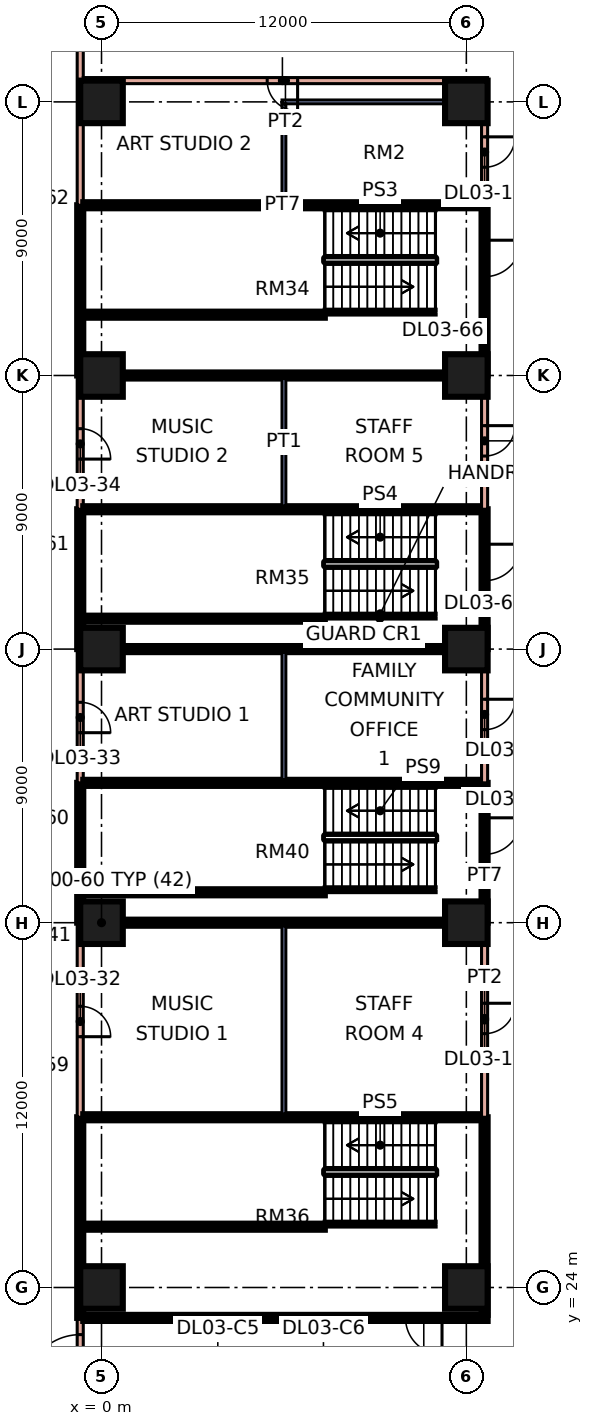
"""IFC4 building model, lengths in metres.
Left out: names, types, materials, properties, quantities, classifications, styles, units other than length and angle.
Written with IfcOpenShell. Run it as: python <this file> out.ifc"""

import sys

from ifc_helpers import new_model, si_unit, direction, frame, frame_2d, origin, origin_2d, place, context, subcontext, project, spatial, rectangle, extrude, element, fill, save


model = new_model("IFC4")
c1 = context("Model", 3, precision=1e-05, world=origin(), true_north=direction((0.0, 1.0)))
c2 = subcontext(c1, "Body", "Model", "MODEL_VIEW")
j1 = project(units=[si_unit("LENGTHUNIT", "METRE"), si_unit("PLANEANGLEUNIT", "RADIAN")], contexts=[c1])
p1 = place(None, origin())
s1 = spatial("IfcSite", under=j1, at=p1, CompositionType="ELEMENT")
p2 = place(p1, origin())
s2 = spatial("IfcBuilding", under=s1, at=p2, CompositionType="ELEMENT")
p3 = place(p2, frame((0.0, 0.0, 16.8)))
s3 = spatial("IfcBuildingStorey", under=s2, at=p3, CompositionType="ELEMENT", Elevation=16.8)
for number, where, z_axis, x_axis in (
    (1, (0.0, 24.0, 0.0), (0.0, 0.0, 1.0), (1.0, 0.0, 0.0)),
    (2, (12.0, 24.0, 0.0), (0.0, 0.0, 1.0), (1.0, 0.0, 0.0)),
    (3, (0.0, 36.0, 0.0), (0.0, 0.0, 1.0), (1.0, 0.0, 0.0)),
    (4, (12.0, 36.0, 0.0), (0.0, 0.0, 1.0), (1.0, 0.0, 0.0)),
    (5, (0.0, 45.0, 0.0), (0.0, 0.0, 1.0), (1.0, 0.0, 0.0)),
    (6, (12.0, 45.0, 0.0), (0.0, 0.0, 1.0), (1.0, 0.0, 0.0)),
    (7, (0.0, 54.0, 0.0), (0.0, 0.0, 1.0), (1.0, 0.0, 0.0)),
    (8, (12.0, 54.0, 0.0), (0.0, 0.0, 1.0), (1.0, 0.0, 0.0)),
    (9, (0.0, 63.0, 0.0), (0.0, 0.0, 1.0), (1.0, 0.0, 0.0)),
    (10, (12.0, 63.0, 0.0), (0.0, 0.0, 1.0), (1.0, 0.0, 0.0)),
):
    element("IfcColumn", number, at=place(p3, frame(where, z_axis=z_axis, x_axis=x_axis)), inside=s3, PredefinedType="COLUMN", context=c2, shape_type="SweptSolid", body=[
        extrude(rectangle(XDim=1.4, YDim=1.4, at=origin_2d()), origin(), (0.0, 0.0, 1.0), 4.8),
    ])
p4 = place(p3, frame((-0.7, 1.304, 0.0), z_axis=(0.0, 0.0, 1.0), x_axis=(0.0, 1.0, 0.0)))
e11 = element("IfcWall", 11, at=p4, inside=s3, PredefinedType="PARTITIONING", context=c2, shape_type="SweptSolid", body=[
    extrude(rectangle(XDim=21.696, YDim=0.2, at=frame_2d((10.848, 0.0))), origin(), (0.0, 0.0, 1.0), 4.4),
])
p5 = place(p4, frame((19.346, 0.0, 0.0)))
e12 = element("IfcOpeningElement", 12, at=p5, cuts=e11, PredefinedType="OPENING", context=c2, shape_type="SweptSolid", body=[
    extrude(rectangle(XDim=1.8, YDim=2.1, at=frame_2d((0.9, 1.05))), frame((0.0, 0.11, 0.0), z_axis=(0.0, -1.0, 0.0), x_axis=(1.0, 0.0, 0.0)), (0.0, 0.0, 1.0), 0.22),
])
p6 = place(p4, frame((11.596, 0.0, 0.0)))
e13 = element("IfcOpeningElement", 13, at=p6, cuts=e11, PredefinedType="OPENING", context=c2, shape_type="SweptSolid", body=[
    extrude(rectangle(XDim=1.0, YDim=2.1, at=frame_2d((0.5, 1.05))), frame((0.0, 0.11, 0.0), z_axis=(0.0, -1.0, 0.0), x_axis=(1.0, 0.0, 0.0)), (0.0, 0.0, 1.0), 0.22),
])
p7 = place(p4, frame((2.295, 0.0, 0.0)))
e14 = element("IfcOpeningElement", 14, at=p7, cuts=e11, PredefinedType="OPENING", context=c2, shape_type="SweptSolid", body=[
    extrude(rectangle(XDim=1.0, YDim=2.1, at=frame_2d((0.5, 1.05))), frame((0.0, 0.11, 0.0), z_axis=(0.0, -1.0, 0.0), x_axis=(1.0, 0.0, 0.0)), (0.0, 0.0, 1.0), 0.22),
])
p8 = place(p3, frame((-0.7, 23.0, 0.0), z_axis=(0.0, 0.0, 1.0), x_axis=(0.0, 1.0, 0.0)))
e15 = element("IfcWall", 15, at=p8, inside=s3, PredefinedType="SOLIDWALL", context=c2, shape_type="SweptSolid", body=[
    extrude(rectangle(XDim=6.6, YDim=0.2, at=frame_2d((3.3, 0.0))), origin(), (0.0, 0.0, 1.0), 4.4),
])
p9 = place(p3, frame((-0.7, 29.6, 0.0), z_axis=(0.0, 0.0, 1.0), x_axis=(0.0, 1.0, 0.0)))
e16 = element("IfcWall", 16, at=p9, inside=s3, PredefinedType="PARTITIONING", context=c2, shape_type="SweptSolid", body=[
    extrude(rectangle(XDim=6.4, YDim=0.2, at=frame_2d((3.2, 0.0))), origin(), (0.0, 0.0, 1.0), 4.4),
])
p10 = place(p9, frame((2.65, 0.0, 0.0)))
e17 = element("IfcOpeningElement", 17, at=p10, cuts=e16, PredefinedType="OPENING", context=c2, shape_type="SweptSolid", body=[
    extrude(rectangle(XDim=1.0, YDim=2.1, at=frame_2d((0.5, 1.05))), frame((0.0, 0.11, 0.0), z_axis=(0.0, -1.0, 0.0), x_axis=(1.0, 0.0, 0.0)), (0.0, 0.0, 1.0), 0.22),
])
p11 = place(p3, frame((-0.7, 36.0, 0.0), z_axis=(0.0, 0.0, 1.0), x_axis=(0.0, 1.0, 0.0)))
e18 = element("IfcWall", 18, at=p11, inside=s3, PredefinedType="SOLIDWALL", context=c2, shape_type="SweptSolid", body=[
    extrude(rectangle(XDim=4.6, YDim=0.2, at=frame_2d((2.3, 0.0))), origin(), (0.0, 0.0, 1.0), 4.4),
])
p12 = place(p3, frame((-0.7, 40.6, 0.0), z_axis=(0.0, 0.0, 1.0), x_axis=(0.0, 1.0, 0.0)))
e19 = element("IfcWall", 19, at=p12, inside=s3, PredefinedType="PARTITIONING", context=c2, shape_type="SweptSolid", body=[
    extrude(rectangle(XDim=4.4, YDim=0.2, at=frame_2d((2.2, 0.0))), origin(), (0.0, 0.0, 1.0), 4.4),
])
p13 = place(p12, frame((1.65, 0.0, 0.0)))
e20 = element("IfcOpeningElement", 20, at=p13, cuts=e19, PredefinedType="OPENING", context=c2, shape_type="SweptSolid", body=[
    extrude(rectangle(XDim=1.0, YDim=2.1, at=frame_2d((0.5, 1.05))), frame((0.0, 0.11, 0.0), z_axis=(0.0, -1.0, 0.0), x_axis=(1.0, 0.0, 0.0)), (0.0, 0.0, 1.0), 0.22),
])
p14 = place(p3, frame((-0.7, 45.0, 0.0), z_axis=(0.0, 0.0, 1.0), x_axis=(0.0, 1.0, 0.0)))
e21 = element("IfcWall", 21, at=p14, inside=s3, PredefinedType="SOLIDWALL", context=c2, shape_type="SweptSolid", body=[
    extrude(rectangle(XDim=4.6, YDim=0.2, at=frame_2d((2.3, 0.0))), origin(), (0.0, 0.0, 1.0), 4.4),
])
p15 = place(p3, frame((-0.7, 49.6, 0.0), z_axis=(0.0, 0.0, 1.0), x_axis=(0.0, 1.0, 0.0)))
e22 = element("IfcWall", 22, at=p15, inside=s3, PredefinedType="PARTITIONING", context=c2, shape_type="SweptSolid", body=[
    extrude(rectangle(XDim=4.4, YDim=0.2, at=frame_2d((2.2, 0.0))), origin(), (0.0, 0.0, 1.0), 4.4),
])
p16 = place(p15, frame((1.65, 0.0, 0.0)))
e23 = element("IfcOpeningElement", 23, at=p16, cuts=e22, PredefinedType="OPENING", context=c2, shape_type="SweptSolid", body=[
    extrude(rectangle(XDim=1.0, YDim=2.1, at=frame_2d((0.5, 1.05))), frame((0.0, 0.11, 0.0), z_axis=(0.0, -1.0, 0.0), x_axis=(1.0, 0.0, 0.0)), (0.0, 0.0, 1.0), 0.22),
])
p17 = place(p3, frame((-0.7, 54.0, 0.0), z_axis=(0.0, 0.0, 1.0), x_axis=(0.0, 1.0, 0.0)))
e24 = element("IfcWall", 24, at=p17, inside=s3, PredefinedType="SOLIDWALL", context=c2, shape_type="SweptSolid", body=[
    extrude(rectangle(XDim=5.6, YDim=0.2, at=frame_2d((2.8, 0.0))), origin(), (0.0, 0.0, 1.0), 4.4),
])
p18 = place(p3, frame((-0.7, 59.6, 0.0), z_axis=(0.0, 0.0, 1.0), x_axis=(0.0, 1.0, 0.0)))
e25 = element("IfcWall", 25, at=p18, inside=s3, PredefinedType="PARTITIONING", context=c2, shape_type="SweptSolid", body=[
    extrude(rectangle(XDim=6.4, YDim=0.2, at=frame_2d((3.2, 0.0))), origin(), (0.0, 0.0, 1.0), 4.4),
])
p19 = place(p3, frame((-0.6, 23.0, 0.0), z_axis=(0.0, 0.0, 1.0), x_axis=(1.0, 0.0, 0.0)))
e26 = element("IfcWall", 26, at=p19, inside=s3, PredefinedType="SOLIDWALL", context=c2, shape_type="SweptSolid", body=[
    extrude(rectangle(XDim=13.3, YDim=0.2, at=frame_2d((6.65, 0.0))), origin(), (0.0, 0.0, 1.0), 4.4),
])
p20 = place(p19, frame((10.6, 0.0, 0.0)))
e27 = element("IfcOpeningElement", 27, at=p20, cuts=e26, PredefinedType="OPENING", context=c2, shape_type="SweptSolid", body=[
    extrude(rectangle(XDim=1.2, YDim=2.1, at=frame_2d((0.6, 1.05))), frame((0.0, 0.11, 0.0), z_axis=(0.0, -1.0, 0.0), x_axis=(1.0, 0.0, 0.0)), (0.0, 0.0, 1.0), 0.22),
])
for number, where, z_axis, x_axis in (
    (28, (-0.6, 29.6, 0.0), (0.0, 0.0, 1.0), (1.0, 0.0, 0.0)),
    (29, (-0.6, 36.0, 0.0), (0.0, 0.0, 1.0), (1.0, 0.0, 0.0)),
    (30, (-0.6, 40.6, 0.0), (0.0, 0.0, 1.0), (1.0, 0.0, 0.0)),
    (31, (-0.6, 45.0, 0.0), (0.0, 0.0, 1.0), (1.0, 0.0, 0.0)),
    (32, (-0.6, 49.6, 0.0), (0.0, 0.0, 1.0), (1.0, 0.0, 0.0)),
    (33, (-0.6, 54.0, 0.0), (0.0, 0.0, 1.0), (1.0, 0.0, 0.0)),
    (34, (-0.6, 59.6, 0.0), (0.0, 0.0, 1.0), (1.0, 0.0, 0.0)),
):
    element("IfcWall", number, at=place(p3, frame(where, z_axis=z_axis, x_axis=x_axis)), inside=s3, PredefinedType="SOLIDWALL", context=c2, shape_type="SweptSolid", body=[
        extrude(rectangle(XDim=13.1, YDim=0.2, at=frame_2d((6.55, 0.0))), origin(), (0.0, 0.0, 1.0), 4.4),
    ])
p21 = place(p3, frame((-0.6, 63.7, 0.0), z_axis=(0.0, 0.0, 1.0), x_axis=(1.0, 0.0, 0.0)))
e35 = element("IfcWall", 35, at=p21, inside=s3, PredefinedType="PARTITIONING", context=c2, shape_type="SweptSolid", body=[
    extrude(rectangle(XDim=13.3, YDim=0.2, at=frame_2d((6.65, 0.0))), origin(), (0.0, 0.0, 1.0), 4.4),
])
p22 = place(p21, frame((6.05, 0.0, 0.0)))
e36 = element("IfcOpeningElement", 36, at=p22, cuts=e35, PredefinedType="OPENING", context=c2, shape_type="SweptSolid", body=[
    extrude(rectangle(XDim=1.0, YDim=2.1, at=frame_2d((0.5, 1.05))), frame((0.0, 0.11, 0.0), z_axis=(0.0, -1.0, 0.0), x_axis=(1.0, 0.0, 0.0)), (0.0, 0.0, 1.0), 0.22),
])
p23 = place(p3, frame((5.938, 63.0, 0.0), z_axis=(0.0, 0.0, 1.0), x_axis=(1.0, 0.0, 0.0)))
e37 = element("IfcWall", 37, at=p23, inside=s3, PredefinedType="PARTITIONING", context=c2, shape_type="SweptSolid", body=[
    extrude(rectangle(XDim=6.562, YDim=0.125, at=frame_2d((3.281, 0.0))), origin(), (0.0, 0.0, 1.0), 4.4),
])
p24 = place(p3, frame((6.0, 29.7, 0.0), z_axis=(0.0, 0.0, 1.0), x_axis=(0.0, 1.0, 0.0)))
e38 = element("IfcWall", 38, at=p24, inside=s3, PredefinedType="PARTITIONING", context=c2, shape_type="SweptSolid", body=[
    extrude(rectangle(XDim=6.2, YDim=0.125, at=frame_2d((3.1, 0.0))), origin(), (0.0, 0.0, 1.0), 4.4),
])
for number, where, z_axis, x_axis in (
    (39, (6.0, 40.7, 0.0), (0.0, 0.0, 1.0), (0.0, 1.0, 0.0)),
    (40, (6.0, 49.7, 0.0), (0.0, 0.0, 1.0), (0.0, 1.0, 0.0)),
):
    element("IfcWall", number, at=place(p3, frame(where, z_axis=z_axis, x_axis=x_axis)), inside=s3, PredefinedType="PARTITIONING", context=c2, shape_type="SweptSolid", body=[
        extrude(rectangle(XDim=4.2, YDim=0.125, at=frame_2d((2.1, 0.0))), origin(), (0.0, 0.0, 1.0), 4.4),
    ])
p25 = place(p3, frame((6.0, 59.7, 0.0), z_axis=(0.0, 0.0, 1.0), x_axis=(0.0, 1.0, 0.0)))
e41 = element("IfcWall", 41, at=p25, inside=s3, PredefinedType="PARTITIONING", context=c2, shape_type="SweptSolid", body=[
    extrude(rectangle(XDim=3.238, YDim=0.125, at=frame_2d((1.619, 0.0))), origin(), (0.0, 0.0, 1.0), 4.4),
])
p26 = place(p3, frame((12.6, 23.1, 0.0), z_axis=(0.0, 0.0, 1.0), x_axis=(0.0, 1.0, 0.0)))
e42 = element("IfcWall", 42, at=p26, inside=s3, PredefinedType="SOLIDWALL", context=c2, shape_type="SweptSolid", body=[
    extrude(rectangle(XDim=6.5, YDim=0.2, at=frame_2d((3.25, 0.0))), origin(), (0.0, 0.0, 1.0), 4.4),
])
p27 = place(p3, frame((12.6, 29.6, 0.0), z_axis=(0.0, 0.0, 1.0), x_axis=(0.0, 1.0, 0.0)))
e43 = element("IfcWall", 43, at=p27, inside=s3, PredefinedType="PARTITIONING", context=c2, shape_type="SweptSolid", body=[
    extrude(rectangle(XDim=6.4, YDim=0.2, at=frame_2d((3.2, 0.0))), origin(), (0.0, 0.0, 1.0), 4.4),
])
p28 = place(p27, frame((2.75, 0.0, 0.0)))
e44 = element("IfcOpeningElement", 44, at=p28, cuts=e43, PredefinedType="OPENING", context=c2, shape_type="SweptSolid", body=[
    extrude(rectangle(XDim=1.0, YDim=2.1, at=frame_2d((0.5, 1.05))), frame((0.0, 0.11, 0.0), z_axis=(0.0, -1.0, 0.0), x_axis=(1.0, 0.0, 0.0)), (0.0, 0.0, 1.0), 0.22),
])
p29 = place(p3, frame((12.6, 36.0, 0.0), z_axis=(0.0, 0.0, 1.0), x_axis=(0.0, 1.0, 0.0)))
e45 = element("IfcWall", 45, at=p29, inside=s3, PredefinedType="SOLIDWALL", context=c2, shape_type="SweptSolid", body=[
    extrude(rectangle(XDim=4.6, YDim=0.2, at=frame_2d((2.3, 0.0))), origin(), (0.0, 0.0, 1.0), 4.4),
])
p30 = place(p29, frame((2.25, 0.0, 0.0)))
e46 = element("IfcOpeningElement", 46, at=p30, cuts=e45, PredefinedType="OPENING", context=c2, shape_type="SweptSolid", body=[
    extrude(rectangle(XDim=1.2, YDim=2.1, at=frame_2d((0.6, 1.05))), frame((0.0, 0.11, 0.0), z_axis=(0.0, -1.0, 0.0), x_axis=(1.0, 0.0, 0.0)), (0.0, 0.0, 1.0), 0.22),
])
p31 = place(p3, frame((12.6, 40.6, 0.0), z_axis=(0.0, 0.0, 1.0), x_axis=(0.0, 1.0, 0.0)))
e47 = element("IfcWall", 47, at=p31, inside=s3, PredefinedType="PARTITIONING", context=c2, shape_type="SweptSolid", body=[
    extrude(rectangle(XDim=4.4, YDim=0.2, at=frame_2d((2.2, 0.0))), origin(), (0.0, 0.0, 1.0), 4.4),
])
p32 = place(p31, frame((1.75, 0.0, 0.0)))
e48 = element("IfcOpeningElement", 48, at=p32, cuts=e47, PredefinedType="OPENING", context=c2, shape_type="SweptSolid", body=[
    extrude(rectangle(XDim=1.0, YDim=2.1, at=frame_2d((0.5, 1.05))), frame((0.0, 0.11, 0.0), z_axis=(0.0, -1.0, 0.0), x_axis=(1.0, 0.0, 0.0)), (0.0, 0.0, 1.0), 0.22),
])
p33 = place(p3, frame((12.6, 45.0, 0.0), z_axis=(0.0, 0.0, 1.0), x_axis=(0.0, 1.0, 0.0)))
e49 = element("IfcWall", 49, at=p33, inside=s3, PredefinedType="SOLIDWALL", context=c2, shape_type="SweptSolid", body=[
    extrude(rectangle(XDim=4.6, YDim=0.2, at=frame_2d((2.3, 0.0))), origin(), (0.0, 0.0, 1.0), 4.4),
])
p34 = place(p33, frame((2.25, 0.0, 0.0)))
e50 = element("IfcOpeningElement", 50, at=p34, cuts=e49, PredefinedType="OPENING", context=c2, shape_type="SweptSolid", body=[
    extrude(rectangle(XDim=1.2, YDim=2.1, at=frame_2d((0.6, 1.05))), frame((0.0, 0.11, 0.0), z_axis=(0.0, -1.0, 0.0), x_axis=(1.0, 0.0, 0.0)), (0.0, 0.0, 1.0), 0.22),
])
p35 = place(p3, frame((12.6, 49.6, 0.0), z_axis=(0.0, 0.0, 1.0), x_axis=(0.0, 1.0, 0.0)))
e51 = element("IfcWall", 51, at=p35, inside=s3, PredefinedType="PARTITIONING", context=c2, shape_type="SweptSolid", body=[
    extrude(rectangle(XDim=4.4, YDim=0.2, at=frame_2d((2.2, 0.0))), origin(), (0.0, 0.0, 1.0), 4.4),
])
p36 = place(p35, frame((1.75, 0.0, 0.0)))
e52 = element("IfcOpeningElement", 52, at=p36, cuts=e51, PredefinedType="OPENING", context=c2, shape_type="SweptSolid", body=[
    extrude(rectangle(XDim=1.0, YDim=2.1, at=frame_2d((0.5, 1.05))), frame((0.0, 0.11, 0.0), z_axis=(0.0, -1.0, 0.0), x_axis=(1.0, 0.0, 0.0)), (0.0, 0.0, 1.0), 0.22),
])
p37 = place(p3, frame((12.6, 54.0, 0.0), z_axis=(0.0, 0.0, 1.0), x_axis=(0.0, 1.0, 0.0)))
e53 = element("IfcWall", 53, at=p37, inside=s3, PredefinedType="SOLIDWALL", context=c2, shape_type="SweptSolid", body=[
    extrude(rectangle(XDim=5.6, YDim=0.2, at=frame_2d((2.8, 0.0))), origin(), (0.0, 0.0, 1.0), 4.4),
])
p38 = place(p37, frame((3.25, 0.0, 0.0)))
e54 = element("IfcOpeningElement", 54, at=p38, cuts=e53, PredefinedType="OPENING", context=c2, shape_type="SweptSolid", body=[
    extrude(rectangle(XDim=1.2, YDim=2.1, at=frame_2d((0.6, 1.05))), frame((0.0, 0.11, 0.0), z_axis=(0.0, -1.0, 0.0), x_axis=(1.0, 0.0, 0.0)), (0.0, 0.0, 1.0), 0.22),
])
p39 = place(p3, frame((12.6, 59.6, 0.0), z_axis=(0.0, 0.0, 1.0), x_axis=(0.0, 1.0, 0.0)))
e55 = element("IfcWall", 55, at=p39, inside=s3, PredefinedType="PARTITIONING", context=c2, shape_type="SweptSolid", body=[
    extrude(rectangle(XDim=4.0, YDim=0.2, at=frame_2d((2.0, 0.0))), origin(), (0.0, 0.0, 1.0), 4.4),
])
p40 = place(p39, frame((1.25, 0.0, 0.0)))
e56 = element("IfcOpeningElement", 56, at=p40, cuts=e55, PredefinedType="OPENING", context=c2, shape_type="SweptSolid", body=[
    extrude(rectangle(XDim=1.0, YDim=2.1, at=frame_2d((0.5, 1.05))), frame((0.0, 0.11, 0.0), z_axis=(0.0, -1.0, 0.0), x_axis=(1.0, 0.0, 0.0)), (0.0, 0.0, 1.0), 0.22),
])
for number, where, z_axis, x_axis in (
    (57, (-0.6, 56.0, 0.0), (0.0, 0.0, 1.0), (1.0, 0.0, 0.0)),
    (58, (-0.6, 46.0, 0.0), (0.0, 0.0, 1.0), (1.0, 0.0, 0.0)),
    (59, (-0.6, 26.0, 0.0), (0.0, 0.0, 1.0), (1.0, 0.0, 0.0)),
    (60, (-0.6, 37.0, 0.0), (0.0, 0.0, 1.0), (1.0, 0.0, 0.0)),
):
    element("IfcWall", number, at=place(p3, frame(where, z_axis=z_axis, x_axis=x_axis)), inside=s3, PredefinedType="SOLIDWALL", context=c2, shape_type="SweptSolid", body=[
        extrude(rectangle(XDim=7.945, YDim=0.2, at=frame_2d((3.973, 0.0))), origin(), (0.0, 0.0, 1.0), 4.4),
    ])
p41 = place(p28, origin())
e61 = element("IfcDoor", 61, at=p41, inside=s3, OperationType="SINGLE_SWING_RIGHT", PredefinedType="DOOR", context=c2, shape_type="SweptSolid", body=[
    extrude(rectangle(XDim=1.0, YDim=2.1, at=frame_2d((0.5, 1.05))), frame((0.0, 0.025, 0.0), z_axis=(0.0, -1.0, 0.0), x_axis=(1.0, 0.0, 0.0)), (0.0, 0.0, 1.0), 0.05),
])
fill(e44, e61)
p42 = place(p32, origin())
e62 = element("IfcDoor", 62, at=p42, inside=s3, OperationType="SINGLE_SWING_RIGHT", PredefinedType="DOOR", context=c2, shape_type="SweptSolid", body=[
    extrude(rectangle(XDim=1.0, YDim=2.1, at=frame_2d((0.5, 1.05))), frame((0.0, 0.025, 0.0), z_axis=(0.0, -1.0, 0.0), x_axis=(1.0, 0.0, 0.0)), (0.0, 0.0, 1.0), 0.05),
])
fill(e48, e62)
p43 = place(p36, origin())
e63 = element("IfcDoor", 63, at=p43, inside=s3, OperationType="SINGLE_SWING_RIGHT", PredefinedType="DOOR", context=c2, shape_type="SweptSolid", body=[
    extrude(rectangle(XDim=1.0, YDim=2.1, at=frame_2d((0.5, 1.05))), frame((0.0, 0.025, 0.0), z_axis=(0.0, -1.0, 0.0), x_axis=(1.0, 0.0, 0.0)), (0.0, 0.0, 1.0), 0.05),
])
fill(e52, e63)
p44 = place(p40, origin())
e64 = element("IfcDoor", 64, at=p44, inside=s3, OperationType="SINGLE_SWING_RIGHT", PredefinedType="DOOR", context=c2, shape_type="SweptSolid", body=[
    extrude(rectangle(XDim=1.0, YDim=2.1, at=frame_2d((0.5, 1.05))), frame((0.0, 0.025, 0.0), z_axis=(0.0, -1.0, 0.0), x_axis=(1.0, 0.0, 0.0)), (0.0, 0.0, 1.0), 0.05),
])
fill(e56, e64)
p45 = place(p10, frame((1.0, 0.0, 0.0), z_axis=(0.0, 0.0, 1.0), x_axis=(-1.0, 0.0, 0.0)))
e65 = element("IfcDoor", 65, at=p45, inside=s3, OperationType="SINGLE_SWING_LEFT", PredefinedType="DOOR", context=c2, shape_type="SweptSolid", body=[
    extrude(rectangle(XDim=1.0, YDim=2.1, at=frame_2d((0.5, 1.05))), frame((0.0, 0.025, 0.0), z_axis=(0.0, -1.0, 0.0), x_axis=(1.0, 0.0, 0.0)), (0.0, 0.0, 1.0), 0.05),
])
fill(e17, e65)
p46 = place(p13, frame((1.0, 0.0, 0.0), z_axis=(0.0, 0.0, 1.0), x_axis=(-1.0, 0.0, 0.0)))
e66 = element("IfcDoor", 66, at=p46, inside=s3, OperationType="SINGLE_SWING_LEFT", PredefinedType="DOOR", context=c2, shape_type="SweptSolid", body=[
    extrude(rectangle(XDim=1.0, YDim=2.1, at=frame_2d((0.5, 1.05))), frame((0.0, 0.025, 0.0), z_axis=(0.0, -1.0, 0.0), x_axis=(1.0, 0.0, 0.0)), (0.0, 0.0, 1.0), 0.05),
])
fill(e20, e66)
p47 = place(p16, frame((1.0, 0.0, 0.0), z_axis=(0.0, 0.0, 1.0), x_axis=(-1.0, 0.0, 0.0)))
e67 = element("IfcDoor", 67, at=p47, inside=s3, OperationType="SINGLE_SWING_LEFT", PredefinedType="DOOR", context=c2, shape_type="SweptSolid", body=[
    extrude(rectangle(XDim=1.0, YDim=2.1, at=frame_2d((0.5, 1.05))), frame((0.0, 0.025, 0.0), z_axis=(0.0, -1.0, 0.0), x_axis=(1.0, 0.0, 0.0)), (0.0, 0.0, 1.0), 0.05),
])
fill(e23, e67)
p48 = place(p22, origin())
e68 = element("IfcDoor", 68, at=p48, inside=s3, OperationType="SINGLE_SWING_RIGHT", PredefinedType="DOOR", context=c2, shape_type="SweptSolid", body=[
    extrude(rectangle(XDim=1.0, YDim=2.1, at=frame_2d((0.5, 1.05))), frame((0.0, 0.025, 0.0), z_axis=(0.0, -1.0, 0.0), x_axis=(1.0, 0.0, 0.0)), (0.0, 0.0, 1.0), 0.05),
])
fill(e36, e68)
p49 = place(p5, origin())
e69 = element("IfcDoor", 69, at=p49, inside=s3, OperationType="DOUBLE_DOOR_SINGLE_SWING", PredefinedType="DOOR", context=c2, shape_type="SweptSolid", body=[
    extrude(rectangle(XDim=1.8, YDim=2.1, at=frame_2d((0.9, 1.05))), frame((0.0, 0.025, 0.0), z_axis=(0.0, -1.0, 0.0), x_axis=(1.0, 0.0, 0.0)), (0.0, 0.0, 1.0), 0.05),
])
fill(e12, e69)
p50 = place(p38, origin())
e70 = element("IfcDoor", 70, at=p50, inside=s3, OperationType="SINGLE_SWING_RIGHT", PredefinedType="DOOR", context=c2, shape_type="SweptSolid", body=[
    extrude(rectangle(XDim=1.2, YDim=2.1, at=frame_2d((0.6, 1.05))), frame((0.0, 0.025, 0.0), z_axis=(0.0, -1.0, 0.0), x_axis=(1.0, 0.0, 0.0)), (0.0, 0.0, 1.0), 0.05),
])
fill(e54, e70)
p51 = place(p34, origin())
e71 = element("IfcDoor", 71, at=p51, inside=s3, OperationType="SINGLE_SWING_RIGHT", PredefinedType="DOOR", context=c2, shape_type="SweptSolid", body=[
    extrude(rectangle(XDim=1.2, YDim=2.1, at=frame_2d((0.6, 1.05))), frame((0.0, 0.025, 0.0), z_axis=(0.0, -1.0, 0.0), x_axis=(1.0, 0.0, 0.0)), (0.0, 0.0, 1.0), 0.05),
])
fill(e50, e71)
p52 = place(p20, origin())
e72 = element("IfcDoor", 72, at=p52, inside=s3, OperationType="SINGLE_SWING_RIGHT", PredefinedType="DOOR", context=c2, shape_type="SweptSolid", body=[
    extrude(rectangle(XDim=1.2, YDim=2.1, at=frame_2d((0.6, 1.05))), frame((0.0, 0.025, 0.0), z_axis=(0.0, -1.0, 0.0), x_axis=(1.0, 0.0, 0.0)), (0.0, 0.0, 1.0), 0.05),
])
fill(e27, e72)
p53 = place(p30, origin())
e73 = element("IfcDoor", 73, at=p53, inside=s3, OperationType="SINGLE_SWING_RIGHT", PredefinedType="DOOR", context=c2, shape_type="SweptSolid", body=[
    extrude(rectangle(XDim=1.2, YDim=2.1, at=frame_2d((0.6, 1.05))), frame((0.0, 0.025, 0.0), z_axis=(0.0, -1.0, 0.0), x_axis=(1.0, 0.0, 0.0)), (0.0, 0.0, 1.0), 0.05),
])
fill(e46, e73)
save(model, sys.argv[1])
